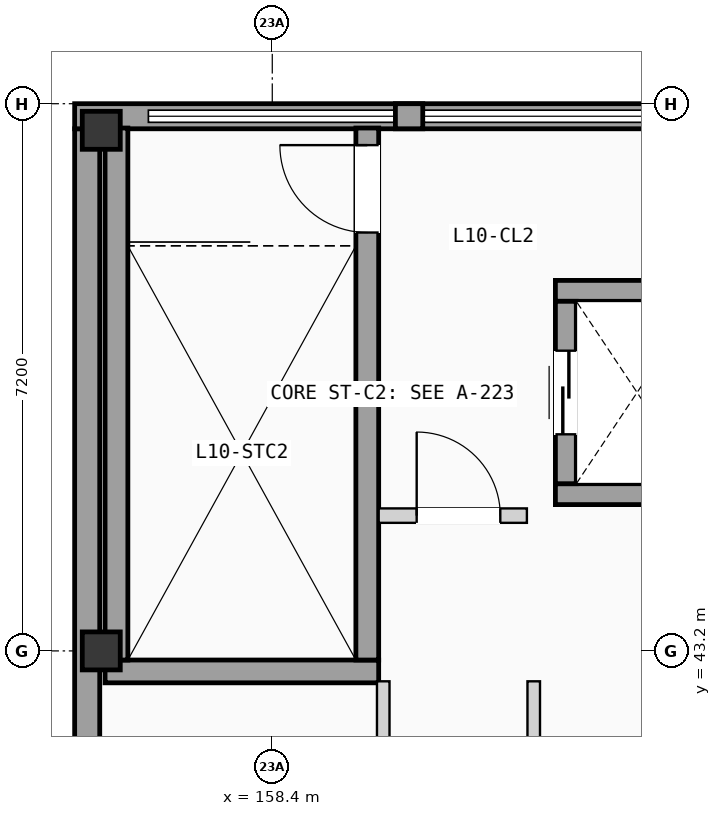
"""IFC4 building model, lengths in metres.
Left out: names, types, materials, properties, quantities, classifications, styles, units other than length and angle.
Written with IfcOpenShell. Run it as: python <this file> out.ifc"""

import sys

from ifc_helpers import new_model, si_unit, direction, frame, frame_2d, origin, origin_2d, place, context, subcontext, project, spatial, rectangle, extrude, element, fill, save


model = new_model("IFC4")
c1 = context("Model", 3, precision=1e-05, world=origin(), true_north=direction((0.0, 1.0)))
c2 = subcontext(c1, "Body", "Model", "MODEL_VIEW")
j1 = project(units=[si_unit("LENGTHUNIT", "METRE"), si_unit("PLANEANGLEUNIT", "RADIAN")], contexts=[c1])
p1 = place(None, origin())
s1 = spatial("IfcSite", under=j1, at=p1, CompositionType="ELEMENT")
p2 = place(p1, origin())
s2 = spatial("IfcBuilding", under=s1, at=p2, CompositionType="ELEMENT")
p3 = place(p2, frame((0.0, 0.0, 34.125)))
s3 = spatial("IfcBuildingStorey", under=s2, at=p3, CompositionType="ELEMENT", Elevation=34.125)
for number, where, z_axis, x_axis in (
    (1, (156.15, 43.2, 0.0), (0.0, 0.0, 1.0), (1.0, 0.0, 0.0)),
    (2, (156.15, 50.05, 0.0), (0.0, 0.0, 1.0), (1.0, 0.0, 0.0)),
):
    element("IfcColumn", number, at=place(p3, frame(where, z_axis=z_axis, x_axis=x_axis)), inside=s3, PredefinedType="COLUMN", context=c2, shape_type="SweptSolid", body=[
        extrude(rectangle(XDim=0.5, YDim=0.5, at=origin_2d()), origin(), (0.0, 0.0, 1.0), 2.85),
    ])
p4 = place(p3, frame((155.965, 0.33, 0.0), z_axis=(0.0, 0.0, 1.0), x_axis=(0.0, 1.0, 0.0)))
e3 = element("IfcWall", 3, at=p4, inside=s3, PredefinedType="SOLIDWALL", context=c2, shape_type="SweptSolid", body=[
    extrude(rectangle(XDim=49.74, YDim=0.33, at=frame_2d((24.87, 0.0))), origin(), (0.0, 0.0, 1.0), 2.55),
])
p5 = place(p4, frame((16.416, 0.0, 0.85)))
e4 = element("IfcOpeningElement", 4, at=p5, cuts=e3, PredefinedType="OPENING", context=c2, shape_type="SweptSolid", body=[
    extrude(rectangle(XDim=0.95, YDim=1.2, at=frame_2d((0.475, 0.6))), frame((0.0, 0.175, 0.0), z_axis=(0.0, -1.0, 0.0), x_axis=(1.0, 0.0, 0.0)), (0.0, 0.0, 1.0), 0.35),
])
p6 = place(p4, frame((21.981, 0.0, 0.85)))
e5 = element("IfcOpeningElement", 5, at=p6, cuts=e3, PredefinedType="OPENING", context=c2, shape_type="SweptSolid", body=[
    extrude(rectangle(XDim=0.95, YDim=1.2, at=frame_2d((0.475, 0.6))), frame((0.0, 0.175, 0.0), z_axis=(0.0, -1.0, 0.0), x_axis=(1.0, 0.0, 0.0)), (0.0, 0.0, 1.0), 0.35),
])
p7 = place(p4, frame((30.92, 0.0, 0.75)))
e6 = element("IfcOpeningElement", 6, at=p7, cuts=e3, PredefinedType="OPENING", context=c2, shape_type="SweptSolid", body=[
    extrude(rectangle(XDim=2.3, YDim=1.35, at=frame_2d((1.15, 0.675))), frame((0.0, 0.175, 0.0), z_axis=(0.0, -1.0, 0.0), x_axis=(1.0, 0.0, 0.0)), (0.0, 0.0, 1.0), 0.35),
])
p8 = place(p3, frame((155.8, 50.235, 0.0), z_axis=(0.0, 0.0, 1.0), x_axis=(1.0, 0.0, 0.0)))
e7 = element("IfcWall", 7, at=p8, inside=s3, PredefinedType="SOLIDWALL", context=c2, shape_type="SweptSolid", body=[
    extrude(rectangle(XDim=8.8, YDim=0.33, at=frame_2d((4.4, 0.0))), origin(), (0.0, 0.0, 1.0), 1.11),
])
p9 = place(p3, frame((160.02, 50.235, 1.11), z_axis=(0.0, 0.0, 1.0), x_axis=(1.0, 0.0, 0.0)))
e8 = element("IfcWall", 8, at=p9, inside=s3, PredefinedType="SOLIDWALL", context=c2, shape_type="SweptSolid", body=[
    extrude(rectangle(XDim=0.36, YDim=0.33, at=frame_2d((0.18, 0.0))), origin(), (0.0, 0.0, 1.0), 1.44),
])
p10 = place(p3, frame((156.2, 42.93, 0.0), z_axis=(0.0, 0.0, 1.0), x_axis=(1.0, 0.0, 0.0)))
e9 = element("IfcWall", 9, at=p10, inside=s3, PredefinedType="SHEAR", context=c2, shape_type="SweptSolid", body=[
    extrude(rectangle(XDim=3.6, YDim=0.3, at=frame_2d((1.8, 0.0))), origin(), (0.0, 0.0, 1.0), 2.55),
])
p11 = place(p3, frame((156.35, 43.08, 0.0), z_axis=(0.0, 0.0, 1.0), x_axis=(0.0, 1.0, 0.0)))
e10 = element("IfcWall", 10, at=p11, inside=s3, PredefinedType="SHEAR", context=c2, shape_type="SweptSolid", body=[
    extrude(rectangle(XDim=7.0, YDim=0.3, at=frame_2d((3.5, 0.0))), origin(), (0.0, 0.0, 1.0), 2.55),
])
p12 = place(p3, frame((159.65, 43.08, 0.0), z_axis=(0.0, 0.0, 1.0), x_axis=(0.0, 1.0, 0.0)))
e11 = element("IfcWall", 11, at=p12, inside=s3, PredefinedType="SHEAR", context=c2, shape_type="SweptSolid", body=[
    extrude(rectangle(XDim=7.0, YDim=0.3, at=frame_2d((3.5, 0.0))), origin(), (0.0, 0.0, 1.0), 2.55),
])
p13 = place(p12, frame((5.625, 0.0, 0.0)))
e12 = element("IfcOpeningElement", 12, at=p13, cuts=e11, PredefinedType="OPENING", context=c2, shape_type="SweptSolid", body=[
    extrude(rectangle(XDim=1.15, YDim=2.12, at=frame_2d((0.575, 1.06))), frame((0.0, 0.16, 0.0), z_axis=(0.0, -1.0, 0.0), x_axis=(1.0, 0.0, 0.0)), (0.0, 0.0, 1.0), 0.32),
])
for number, where, z_axis, x_axis in (
    (13, (162.125, 45.262, 0.0), (0.0, 0.0, 1.0), (1.0, 0.0, 0.0)),
    (14, (162.125, 47.938, 0.0), (0.0, 0.0, 1.0), (1.0, 0.0, 0.0)),
):
    element("IfcWall", number, at=place(p3, frame(where, z_axis=z_axis, x_axis=x_axis)), inside=s3, PredefinedType="SHEAR", context=c2, shape_type="SweptSolid", body=[
        extrude(rectangle(XDim=2.15, YDim=0.275, at=frame_2d((1.075, 0.0))), origin(), (0.0, 0.0, 1.0), 2.55),
    ])
p14 = place(p3, frame((162.262, 45.4, 0.0), z_axis=(0.0, 0.0, 1.0), x_axis=(0.0, 1.0, 0.0)))
e15 = element("IfcWall", 15, at=p14, inside=s3, PredefinedType="SHEAR", context=c2, shape_type="SweptSolid", body=[
    extrude(rectangle(XDim=2.4, YDim=0.275, at=frame_2d((1.2, 0.0))), origin(), (0.0, 0.0, 1.0), 2.55),
])
p15 = place(p14, frame((0.65, 0.0, 0.0)))
e16 = element("IfcOpeningElement", 16, at=p15, cuts=e15, PredefinedType="OPENING", context=c2, shape_type="SweptSolid", body=[
    extrude(rectangle(XDim=1.1, YDim=2.15, at=frame_2d((0.55, 1.075))), frame((0.0, 0.147, 0.0), z_axis=(0.0, -1.0, 0.0), x_axis=(1.0, 0.0, 0.0)), (0.0, 0.0, 1.0), 0.295),
])
p16 = place(p3, frame((159.8, 44.98, 0.0), z_axis=(0.0, 0.0, 1.0), x_axis=(1.0, 0.0, 0.0)))
e17 = element("IfcWall", 17, at=p16, inside=s3, PredefinedType="PARTITIONING", context=c2, shape_type="SweptSolid", body=[
    extrude(rectangle(XDim=1.95, YDim=0.19, at=frame_2d((0.975, 0.0))), origin(), (0.0, 0.0, 1.0), 2.39),
])
p17 = place(p16, frame((0.5, 0.0, 0.0)))
e18 = element("IfcOpeningElement", 18, at=p17, cuts=e17, PredefinedType="OPENING", context=c2, shape_type="SweptSolid", body=[
    extrude(rectangle(XDim=1.1, YDim=2.12, at=frame_2d((0.55, 1.06))), frame((0.0, 0.105, 0.0), z_axis=(0.0, -1.0, 0.0), x_axis=(1.0, 0.0, 0.0)), (0.0, 0.0, 1.0), 0.21),
])
for number, where, z_axis, x_axis in (
    (19, (159.86, 39.03, 0.0), (0.0, 0.0, 1.0), (0.0, 1.0, 0.0)),
    (20, (161.84, 39.03, 0.0), (0.0, 0.0, 1.0), (0.0, 1.0, 0.0)),
):
    element("IfcWall", number, at=place(p3, frame(where, z_axis=z_axis, x_axis=x_axis)), inside=s3, PredefinedType="PARTITIONING", context=c2, shape_type="SweptSolid", body=[
        extrude(rectangle(XDim=3.77, YDim=0.165, at=frame_2d((1.885, 0.0))), origin(), (0.0, 0.0, 1.0), 2.39),
    ])
p18 = place(p13, origin())
e21 = element("IfcDoor", 21, at=p18, inside=s3, OperationType="SINGLE_SWING_RIGHT", PredefinedType="DOOR", context=c2, shape_type="SweptSolid", body=[
    extrude(rectangle(XDim=1.15, YDim=2.12, at=frame_2d((0.575, 1.06))), frame((0.0, 0.025, 0.0), z_axis=(0.0, -1.0, 0.0), x_axis=(1.0, 0.0, 0.0)), (0.0, 0.0, 1.0), 0.05),
])
fill(e12, e21)
p19 = place(p15, origin())
e22 = element("IfcDoor", 22, at=p19, inside=s3, OperationType="SLIDING_TO_LEFT", PredefinedType="DOOR", context=c2, shape_type="SweptSolid", body=[
    extrude(rectangle(XDim=1.1, YDim=2.15, at=frame_2d((0.55, 1.075))), frame((0.0, 0.025, 0.0), z_axis=(0.0, -1.0, 0.0), x_axis=(1.0, 0.0, 0.0)), (0.0, 0.0, 1.0), 0.05),
])
fill(e16, e22)
p20 = place(p17, origin())
e23 = element("IfcDoor", 23, at=p20, inside=s3, OperationType="SINGLE_SWING_LEFT", PredefinedType="DOOR", context=c2, shape_type="SweptSolid", body=[
    extrude(rectangle(XDim=1.1, YDim=2.12, at=frame_2d((0.55, 1.06))), frame((0.0, 0.025, 0.0), z_axis=(0.0, -1.0, 0.0), x_axis=(1.0, 0.0, 0.0)), (0.0, 0.0, 1.0), 0.05),
])
fill(e18, e23)
save(model, sys.argv[1])
